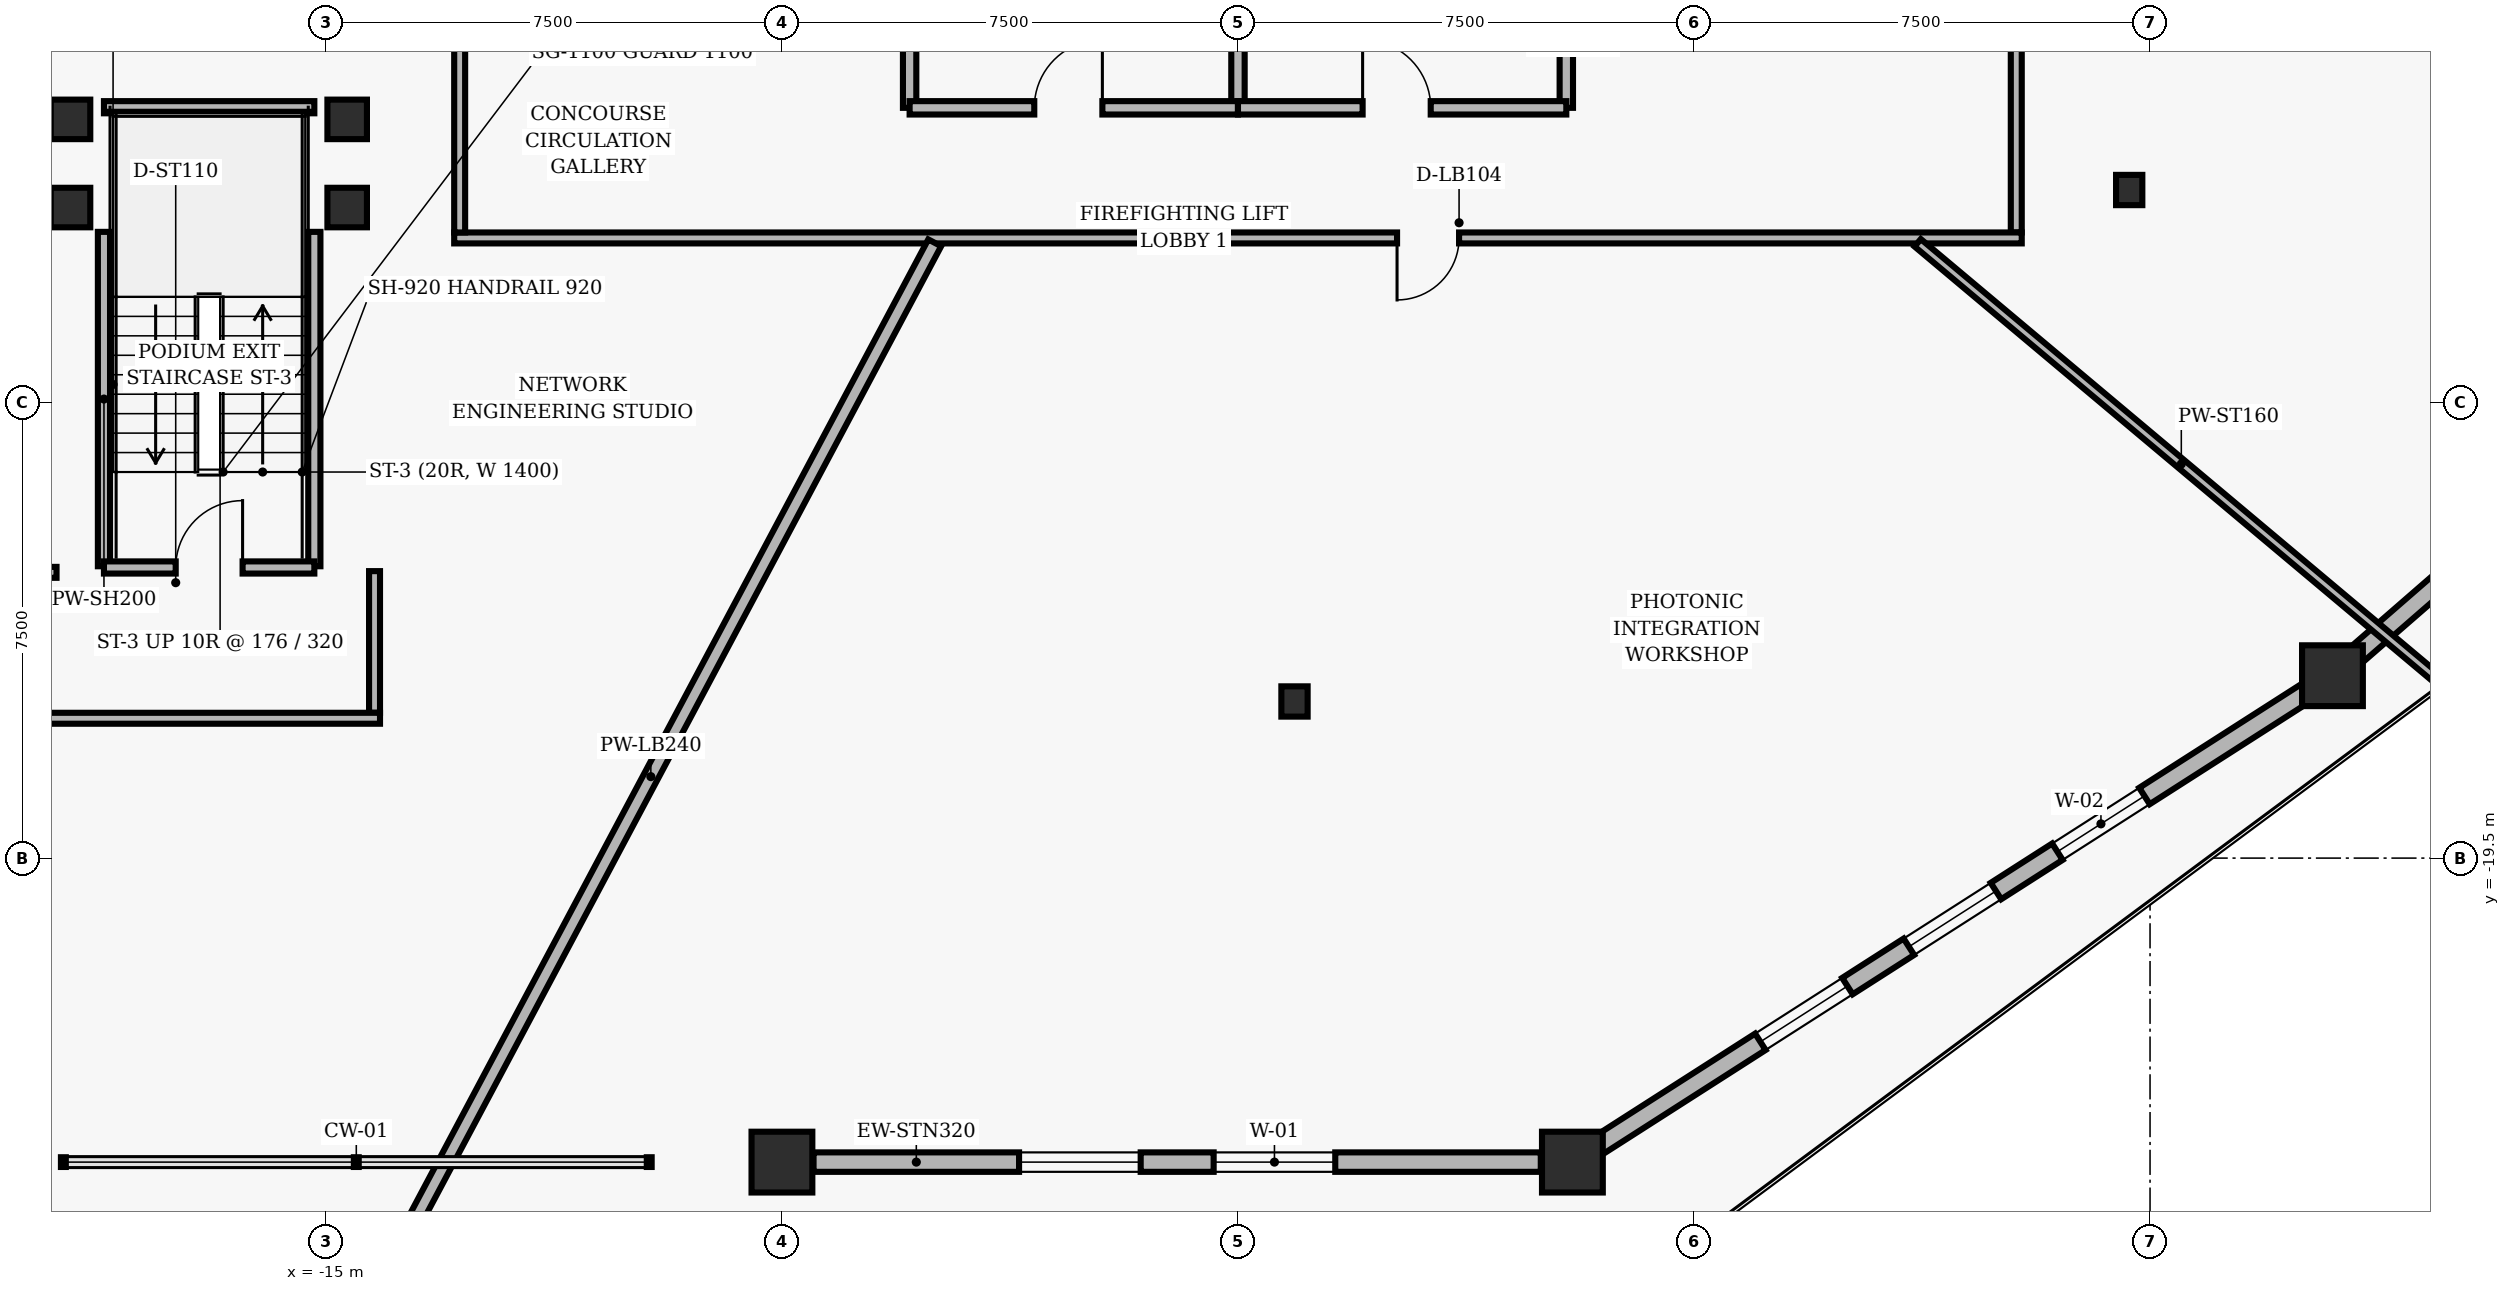
"""IFC4 building model, lengths in metres.
Left out: names, types, materials, properties, quantities, classifications, styles, units other than length and angle.
Written with IfcOpenShell. Run it as: python <this file> out.ifc"""

import sys

from ifc_helpers import new_model, si_unit, direction, frame, frame_2d, origin, origin_2d, place, context, subcontext, project, spatial, rectangle, i_section, extrude, element, fill, save


model = new_model("IFC4")
c1 = context("Model", 3, precision=1e-05, world=origin(), true_north=direction((0.0, 1.0)))
c2 = subcontext(c1, "Body", "Model", "MODEL_VIEW")
j1 = project(units=[si_unit("LENGTHUNIT", "METRE"), si_unit("PLANEANGLEUNIT", "RADIAN")], contexts=[c1])
p1 = place(None, origin())
s1 = spatial("IfcSite", under=j1, at=p1, CompositionType="ELEMENT")
p2 = place(p1, origin())
s2 = spatial("IfcBuilding", under=s1, at=p2, CompositionType="ELEMENT")
p3 = place(p2, frame((0.0, 0.0, 11.84)))
s3 = spatial("IfcBuildingStorey", under=s2, at=p3, CompositionType="ELEMENT", Elevation=11.84)
for number, where, z_axis, x_axis in (
    (1, (-7.5, -24.5, 0.0), (0.0, 0.0, 1.0), (1.0, 0.0, 0.0)),
    (2, (5.5, -24.5, 0.0), (0.0, 0.0, 1.0), (1.0, 0.0, 0.0)),
    (3, (18.0, -16.5, 0.0), (0.0, 0.0, 1.0), (1.0, 0.0, 0.0)),
):
    element("IfcColumn", number, at=place(p3, frame(where, z_axis=z_axis, x_axis=x_axis)), inside=s3, PredefinedType="COLUMN", context=c2, shape_type="SweptSolid", body=[
        extrude(rectangle(XDim=1.0, YDim=1.0, at=origin_2d()), origin(), (0.0, 0.0, 1.0), 3.52),
    ])
for number, where, z_axis, x_axis in (
    (4, (-19.2, -8.8, 0.0), (0.0, 0.0, 1.0), (1.0, 0.0, 0.0)),
    (5, (-14.65, -8.8, 0.0), (0.0, 0.0, 1.0), (1.0, 0.0, 0.0)),
    (6, (-19.2, -7.35, 0.0), (0.0, 0.0, 1.0), (1.0, 0.0, 0.0)),
    (7, (-14.65, -7.35, 0.0), (0.0, 0.0, 1.0), (1.0, 0.0, 0.0)),
):
    element("IfcColumn", number, at=place(p3, frame(where, z_axis=z_axis, x_axis=x_axis)), inside=s3, PredefinedType="COLUMN", context=c2, shape_type="SweptSolid", body=[
        extrude(rectangle(XDim=0.65, YDim=0.65, at=origin_2d()), origin(), (0.0, 0.0, 1.0), 3.52),
    ])
for number, where, z_axis, x_axis in (
    (8, (0.93, -16.924, 0.0), (0.0, 0.0, 1.0), (1.0, 0.0, 0.0)),
    (9, (14.657, -8.512, 0.0), (0.0, 0.0, 1.0), (1.0, 0.0, 0.0)),
):
    element("IfcColumn", number, at=place(p3, frame(where, z_axis=z_axis, x_axis=x_axis)), inside=s3, PredefinedType="COLUMN", context=c2, shape_type="SweptSolid", body=[
        extrude(i_section(OverallWidth=0.432, OverallDepth=0.498, WebThickness=0.056, FlangeThickness=0.089, FilletRadius=0.025, at=origin_2d()), origin(), (0.0, 0.0, 1.0), 3.52),
    ])
p4 = place(p3, frame((4.98, -24.5, 0.0), z_axis=(0.0, 0.0, 1.0), x_axis=(-1.0, 0.0, 0.0)))
e10 = element("IfcWall", 10, at=p4, inside=s3, PredefinedType="SOLIDWALL", context=c2, shape_type="SweptSolid", body=[
    extrude(rectangle(XDim=11.96, YDim=0.32, at=frame_2d((5.98, 0.0))), origin(), (0.0, 0.0, 1.0), 2.548),
])
p5 = place(p4, frame((3.38, 0.0, 0.65)))
e11 = element("IfcOpeningElement", 11, at=p5, cuts=e10, PredefinedType="OPENING", context=c2, shape_type="SweptSolid", body=[
    extrude(rectangle(XDim=2.0, YDim=1.6, at=frame_2d((1.0, 0.8))), frame((0.0, 0.17, 0.0), z_axis=(0.0, -1.0, 0.0), x_axis=(1.0, 0.0, 0.0)), (0.0, 0.0, 1.0), 0.34),
])
p6 = place(p4, frame((6.58, 0.0, 0.65)))
e12 = element("IfcOpeningElement", 12, at=p6, cuts=e10, PredefinedType="OPENING", context=c2, shape_type="SweptSolid", body=[
    extrude(rectangle(XDim=2.0, YDim=1.6, at=frame_2d((1.0, 0.8))), frame((0.0, 0.17, 0.0), z_axis=(0.0, -1.0, 0.0), x_axis=(1.0, 0.0, 0.0)), (0.0, 0.0, 1.0), 0.34),
])
p7 = place(p3, frame((17.562, -16.78, 0.0), z_axis=(0.0, 0.0, 1.0), x_axis=(-0.842268830443, -0.539057712368, 0.0)))
e13 = element("IfcWall", 13, at=p7, inside=s3, PredefinedType="SOLIDWALL", context=c2, shape_type="SweptSolid", body=[
    extrude(rectangle(XDim=13.801, YDim=0.32, at=frame_2d((6.9, 0.0))), origin(), (0.0, 0.0, 1.0), 2.548),
])
p8 = place(p7, frame((3.15, 0.0, 0.65)))
e14 = element("IfcOpeningElement", 14, at=p8, cuts=e13, PredefinedType="OPENING", context=c2, shape_type="SweptSolid", body=[
    extrude(rectangle(XDim=1.7, YDim=1.5, at=frame_2d((0.85, 0.75))), frame((0.0, 0.17, 0.0), z_axis=(0.0, -1.0, 0.0), x_axis=(1.0, 0.0, 0.0)), (0.0, 0.0, 1.0), 0.34),
])
p9 = place(p7, frame((6.05, 0.0, 0.65)))
e15 = element("IfcOpeningElement", 15, at=p9, cuts=e13, PredefinedType="OPENING", context=c2, shape_type="SweptSolid", body=[
    extrude(rectangle(XDim=1.7, YDim=1.5, at=frame_2d((0.85, 0.75))), frame((0.0, 0.17, 0.0), z_axis=(0.0, -1.0, 0.0), x_axis=(1.0, 0.0, 0.0)), (0.0, 0.0, 1.0), 0.34),
])
p10 = place(p7, frame((8.95, 0.0, 0.65)))
e16 = element("IfcOpeningElement", 16, at=p10, cuts=e13, PredefinedType="OPENING", context=c2, shape_type="SweptSolid", body=[
    extrude(rectangle(XDim=1.7, YDim=1.5, at=frame_2d((0.85, 0.75))), frame((0.0, 0.17, 0.0), z_axis=(0.0, -1.0, 0.0), x_axis=(1.0, 0.0, 0.0)), (0.0, 0.0, 1.0), 0.34),
])
p11 = place(p3, frame((29.108, -6.841, 0.0), z_axis=(0.0, 0.0, 1.0), x_axis=(-0.754615886195, -0.656166796098, 0.0)))
e17 = element("IfcWall", 17, at=p11, inside=s3, PredefinedType="SOLIDWALL", context=c2, shape_type="SweptSolid", body=[
    extrude(rectangle(XDim=14.2, YDim=0.32, at=frame_2d((7.1, 0.0))), origin(), (0.0, 0.0, 1.0), 2.221),
])
p12 = place(p11, frame((2.6, 0.0, 0.4)))
e18 = element("IfcOpeningElement", 18, at=p12, cuts=e17, PredefinedType="OPENING", context=c2, shape_type="SweptSolid", body=[
    extrude(rectangle(XDim=2.2, YDim=1.1, at=frame_2d((1.1, 0.55))), frame((0.0, 0.17, 0.0), z_axis=(0.0, -1.0, 0.0), x_axis=(1.0, 0.0, 0.0)), (0.0, 0.0, 1.0), 0.34),
])
p13 = place(p11, frame((6.0, 0.0, 0.4)))
e19 = element("IfcOpeningElement", 19, at=p13, cuts=e17, PredefinedType="OPENING", context=c2, shape_type="SweptSolid", body=[
    extrude(rectangle(XDim=2.2, YDim=1.1, at=frame_2d((1.1, 0.55))), frame((0.0, 0.17, 0.0), z_axis=(0.0, -1.0, 0.0), x_axis=(1.0, 0.0, 0.0)), (0.0, 0.0, 1.0), 0.34),
])
p14 = place(p11, frame((9.4, 0.0, 0.4)))
e20 = element("IfcOpeningElement", 20, at=p14, cuts=e17, PredefinedType="OPENING", context=c2, shape_type="SweptSolid", body=[
    extrude(rectangle(XDim=2.2, YDim=1.1, at=frame_2d((1.1, 0.55))), frame((0.0, 0.17, 0.0), z_axis=(0.0, -1.0, 0.0), x_axis=(1.0, 0.0, 0.0)), (0.0, 0.0, 1.0), 0.34),
])
for number, where, z_axis, x_axis in (
    (21, (-5.4, -7.16, 0.0), (0.0, 0.0, 1.0), (0.0, 1.0, 0.0)),
    (22, (5.4, -7.16, 0.0), (0.0, 0.0, 1.0), (0.0, 1.0, 0.0)),
):
    element("IfcWall", number, at=place(p3, frame(where, z_axis=z_axis, x_axis=x_axis)), inside=s3, PredefinedType="PARTITIONING", context=c2, shape_type="SweptSolid", body=[
        extrude(rectangle(XDim=2.71, YDim=0.22, at=frame_2d((1.355, 0.0))), origin(), (0.0, 0.0, 1.0), 3.153),
    ])
p15 = place(p3, frame((0.0, -7.16, 0.0), z_axis=(0.0, 0.0, 1.0), x_axis=(0.0, 1.0, 0.0)))
e23 = element("IfcWall", 23, at=p15, inside=s3, PredefinedType="PARTITIONING", context=c2, shape_type="SweptSolid", body=[
    extrude(rectangle(XDim=2.81, YDim=0.22, at=frame_2d((1.405, 0.0))), origin(), (0.0, 0.0, 1.0), 3.153),
])
p16 = place(p3, frame((-5.4, -7.16, 0.0), z_axis=(0.0, 0.0, 1.0), x_axis=(1.0, 0.0, 0.0)))
e24 = element("IfcWall", 24, at=p16, inside=s3, PredefinedType="PARTITIONING", context=c2, shape_type="SweptSolid", body=[
    extrude(rectangle(XDim=5.4, YDim=0.22, at=frame_2d((2.7, 0.0))), origin(), (0.0, 0.0, 1.0), 3.153),
])
p17 = place(p16, frame((2.05, 0.0, 0.0)))
e25 = element("IfcOpeningElement", 25, at=p17, cuts=e24, PredefinedType="OPENING", context=c2, shape_type="SweptSolid", body=[
    extrude(rectangle(XDim=1.12, YDim=2.02, at=frame_2d((0.56, 1.01))), frame((0.0, 0.12, 0.0), z_axis=(0.0, -1.0, 0.0), x_axis=(1.0, 0.0, 0.0)), (0.0, 0.0, 1.0), 0.24),
])
p18 = place(p3, frame((0.0, -7.16, 0.0), z_axis=(0.0, 0.0, 1.0), x_axis=(1.0, 0.0, 0.0)))
e26 = element("IfcWall", 26, at=p18, inside=s3, PredefinedType="PARTITIONING", context=c2, shape_type="SweptSolid", body=[
    extrude(rectangle(XDim=5.4, YDim=0.22, at=frame_2d((2.7, 0.0))), origin(), (0.0, 0.0, 1.0), 3.153),
])
p19 = place(p18, frame((2.05, 0.0, 0.0)))
e27 = element("IfcOpeningElement", 27, at=p19, cuts=e26, PredefinedType="OPENING", context=c2, shape_type="SweptSolid", body=[
    extrude(rectangle(XDim=1.12, YDim=2.02, at=frame_2d((0.56, 1.01))), frame((0.0, 0.12, 0.0), z_axis=(0.0, -1.0, 0.0), x_axis=(1.0, 0.0, 0.0)), (0.0, 0.0, 1.0), 0.24),
])
for number, where, z_axis, x_axis in (
    (28, (-18.65, -14.7, 0.0), (0.0, 0.0, 1.0), (0.0, 1.0, 0.0)),
    (29, (-15.19, -14.7, 0.0), (0.0, 0.0, 1.0), (0.0, 1.0, 0.0)),
):
    element("IfcWall", number, at=place(p3, frame(where, z_axis=z_axis, x_axis=x_axis)), inside=s3, PredefinedType="PARTITIONING", context=c2, shape_type="SweptSolid", body=[
        extrude(rectangle(XDim=5.5, YDim=0.2, at=frame_2d((2.75, 0.0))), origin(), (0.0, 0.0, 1.0), 3.153),
    ])
p20 = place(p3, frame((-18.65, -7.15, 0.0), z_axis=(0.0, 0.0, 1.0), x_axis=(1.0, 0.0, 0.0)))
e30 = element("IfcWall", 30, at=p20, inside=s3, PredefinedType="PARTITIONING", context=c2, shape_type="SweptSolid", body=[
    extrude(rectangle(XDim=3.46, YDim=0.2, at=frame_2d((1.73, 0.0))), origin(), (0.0, 0.0, 1.0), 1.3),
])
p21 = place(p3, frame((-18.65, -14.72, 0.0), z_axis=(0.0, 0.0, 1.0), x_axis=(1.0, 0.0, 0.0)))
e31 = element("IfcWall", 31, at=p21, inside=s3, PredefinedType="PARTITIONING", context=c2, shape_type="SweptSolid", body=[
    extrude(rectangle(XDim=3.46, YDim=0.2, at=frame_2d((1.73, 0.0))), origin(), (0.0, 0.0, 1.0), 3.153),
])
p22 = place(p21, frame((1.18, 0.0, 0.0)))
e32 = element("IfcOpeningElement", 32, at=p22, cuts=e31, PredefinedType="OPENING", context=c2, shape_type="SweptSolid", body=[
    extrude(rectangle(XDim=1.1, YDim=2.04, at=frame_2d((0.55, 1.02))), frame((0.0, 0.11, 0.0), z_axis=(0.0, -1.0, 0.0), x_axis=(1.0, 0.0, 0.0)), (0.0, 0.0, 1.0), 0.22),
])
p23 = place(p3, frame((12.8, -1.59, 0.0), z_axis=(0.0, 0.0, 1.0), x_axis=(0.0, -1.0, 0.0)))
e33 = element("IfcWall", 33, at=p23, inside=s3, PredefinedType="PARTITIONING", context=c2, shape_type="SweptSolid", body=[
    extrude(rectangle(XDim=7.62, YDim=0.18, at=frame_2d((3.81, 0.0))), origin(), (0.0, 0.0, 1.0), 3.153),
])
p24 = place(p3, frame((12.89, -9.3, 0.0), z_axis=(0.0, 0.0, 1.0), x_axis=(-1.0, 0.0, 0.0)))
e34 = element("IfcWall", 34, at=p24, inside=s3, PredefinedType="PARTITIONING", context=c2, shape_type="SweptSolid", body=[
    extrude(rectangle(XDim=25.78, YDim=0.18, at=frame_2d((12.89, 0.0))), origin(), (0.0, 0.0, 1.0), 2.72),
])
p25 = place(p24, frame((9.254, 0.0, 0.0)))
e35 = element("IfcOpeningElement", 35, at=p25, cuts=e34, PredefinedType="OPENING", context=c2, shape_type="SweptSolid", body=[
    extrude(rectangle(XDim=1.02, YDim=2.02, at=frame_2d((0.51, 1.01))), frame((0.0, 0.1, 0.0), z_axis=(0.0, -1.0, 0.0), x_axis=(1.0, 0.0, 0.0)), (0.0, 0.0, 1.0), 0.2),
])
p26 = place(p3, frame((-12.8, -9.21, 0.0), z_axis=(0.0, 0.0, 1.0), x_axis=(0.0, 1.0, 0.0)))
e36 = element("IfcWall", 36, at=p26, inside=s3, PredefinedType="PARTITIONING", context=c2, shape_type="SweptSolid", body=[
    extrude(rectangle(XDim=3.02, YDim=0.18, at=frame_2d((1.51, 0.0))), origin(), (0.0, 0.0, 1.0), 3.153),
])
p27 = place(p3, frame((-20.14, -14.8, 0.0), z_axis=(0.0, 0.0, 1.0), x_axis=(1.0, 0.0, 0.0)))
e37 = element("IfcWall", 37, at=p27, inside=s3, PredefinedType="PARTITIONING", context=c2, shape_type="SweptSolid", body=[
    extrude(rectangle(XDim=0.71, YDim=0.18, at=frame_2d((0.355, 0.0))), origin(), (0.0, 0.0, 1.0), 3.153),
])
p28 = place(p3, frame((-14.2, -14.78, 0.0), z_axis=(0.0, 0.0, 1.0), x_axis=(0.0, -1.0, 0.0)))
e38 = element("IfcWall", 38, at=p28, inside=s3, PredefinedType="PARTITIONING", context=c2, shape_type="SweptSolid", body=[
    extrude(rectangle(XDim=2.33, YDim=0.18, at=frame_2d((1.165, 0.0))), origin(), (0.0, 0.0, 1.0), 3.153),
])
p29 = place(p3, frame((-14.11, -17.2, 0.0), z_axis=(0.0, 0.0, 1.0), x_axis=(-1.0, 0.0, 0.0)))
e39 = element("IfcWall", 39, at=p29, inside=s3, PredefinedType="PARTITIONING", context=c2, shape_type="SweptSolid", body=[
    extrude(rectangle(XDim=5.96, YDim=0.18, at=frame_2d((2.98, 0.0))), origin(), (0.0, 0.0, 1.0), 3.153),
])
p30 = place(p3, frame((-4.987, -9.38, 0.0), z_axis=(0.0, 0.0, 1.0), x_axis=(-0.469474122014, -0.882946232088, 0.0)))
e40 = element("IfcWall", 40, at=p30, inside=s3, PredefinedType="PARTITIONING", context=c2, shape_type="SweptSolid", body=[
    extrude(rectangle(XDim=19.888, YDim=0.24, at=frame_2d((9.944, 0.0))), origin(), (0.0, 0.0, 1.0), 3.153),
])
p31 = place(p3, frame((11.179, -9.38, 0.0), z_axis=(0.0, 0.0, 1.0), x_axis=(0.766037025887, -0.642796449095, 0.0)))
e41 = element("IfcWall", 41, at=p31, inside=s3, PredefinedType="PARTITIONING", context=c2, shape_type="SweptSolid", body=[
    extrude(rectangle(XDim=11.32, YDim=0.16, at=frame_2d((5.66, 0.0))), origin(), (0.0, 0.0, 1.0), 2.206),
])
p32 = place(p5, origin())
e42 = element("IfcWindow", 42, at=p32, inside=s3, PartitioningType="SINGLE_PANEL", PredefinedType="WINDOW", context=c2, shape_type="SweptSolid", body=[
    extrude(rectangle(XDim=2.0, YDim=1.6, at=frame_2d((1.0, 0.8))), frame((0.0, 0.03, 0.0), z_axis=(0.0, -1.0, 0.0), x_axis=(1.0, 0.0, 0.0)), (0.0, 0.0, 1.0), 0.06),
])
fill(e11, e42)
p33 = place(p6, origin())
e43 = element("IfcWindow", 43, at=p33, inside=s3, PartitioningType="SINGLE_PANEL", PredefinedType="WINDOW", context=c2, shape_type="SweptSolid", body=[
    extrude(rectangle(XDim=2.0, YDim=1.6, at=frame_2d((1.0, 0.8))), frame((0.0, 0.03, 0.0), z_axis=(0.0, -1.0, 0.0), x_axis=(1.0, 0.0, 0.0)), (0.0, 0.0, 1.0), 0.06),
])
fill(e12, e43)
p34 = place(p8, origin())
e44 = element("IfcWindow", 44, at=p34, inside=s3, PartitioningType="SINGLE_PANEL", PredefinedType="WINDOW", context=c2, shape_type="SweptSolid", body=[
    extrude(rectangle(XDim=1.7, YDim=1.5, at=frame_2d((0.85, 0.75))), frame((0.0, 0.03, 0.0), z_axis=(0.0, -1.0, 0.0), x_axis=(1.0, 0.0, 0.0)), (0.0, 0.0, 1.0), 0.06),
])
fill(e14, e44)
p35 = place(p9, origin())
e45 = element("IfcWindow", 45, at=p35, inside=s3, PartitioningType="SINGLE_PANEL", PredefinedType="WINDOW", context=c2, shape_type="SweptSolid", body=[
    extrude(rectangle(XDim=1.7, YDim=1.5, at=frame_2d((0.85, 0.75))), frame((0.0, 0.03, 0.0), z_axis=(0.0, -1.0, 0.0), x_axis=(1.0, 0.0, 0.0)), (0.0, 0.0, 1.0), 0.06),
])
fill(e15, e45)
p36 = place(p10, origin())
e46 = element("IfcWindow", 46, at=p36, inside=s3, PartitioningType="SINGLE_PANEL", PredefinedType="WINDOW", context=c2, shape_type="SweptSolid", body=[
    extrude(rectangle(XDim=1.7, YDim=1.5, at=frame_2d((0.85, 0.75))), frame((0.0, 0.03, 0.0), z_axis=(0.0, -1.0, 0.0), x_axis=(1.0, 0.0, 0.0)), (0.0, 0.0, 1.0), 0.06),
])
fill(e16, e46)
p37 = place(p17, origin())
e47 = element("IfcDoor", 47, at=p37, inside=s3, OperationType="SINGLE_SWING_RIGHT", PredefinedType="DOOR", context=c2, shape_type="SweptSolid", body=[
    extrude(rectangle(XDim=1.12, YDim=2.02, at=frame_2d((0.56, 1.01))), frame((0.0, 0.025, 0.0), z_axis=(0.0, -1.0, 0.0), x_axis=(1.0, 0.0, 0.0)), (0.0, 0.0, 1.0), 0.05),
])
fill(e25, e47)
p38 = place(p19, origin())
e48 = element("IfcDoor", 48, at=p38, inside=s3, OperationType="SINGLE_SWING_LEFT", PredefinedType="DOOR", context=c2, shape_type="SweptSolid", body=[
    extrude(rectangle(XDim=1.12, YDim=2.02, at=frame_2d((0.56, 1.01))), frame((0.0, 0.025, 0.0), z_axis=(0.0, -1.0, 0.0), x_axis=(1.0, 0.0, 0.0)), (0.0, 0.0, 1.0), 0.05),
])
fill(e27, e48)
p39 = place(p22, origin())
e49 = element("IfcDoor", 49, at=p39, inside=s3, OperationType="SINGLE_SWING_RIGHT", PredefinedType="DOOR", context=c2, shape_type="SweptSolid", body=[
    extrude(rectangle(XDim=1.1, YDim=2.04, at=frame_2d((0.55, 1.02))), frame((0.0, 0.025, 0.0), z_axis=(0.0, -1.0, 0.0), x_axis=(1.0, 0.0, 0.0)), (0.0, 0.0, 1.0), 0.05),
])
fill(e32, e49)
p40 = place(p25, origin())
e50 = element("IfcDoor", 50, at=p40, inside=s3, OperationType="SINGLE_SWING_RIGHT", PredefinedType="DOOR", context=c2, shape_type="SweptSolid", body=[
    extrude(rectangle(XDim=1.02, YDim=2.02, at=frame_2d((0.51, 1.01))), frame((0.0, 0.025, 0.0), z_axis=(0.0, -1.0, 0.0), x_axis=(1.0, 0.0, 0.0)), (0.0, 0.0, 1.0), 0.05),
])
fill(e35, e50)
save(model, sys.argv[1])
